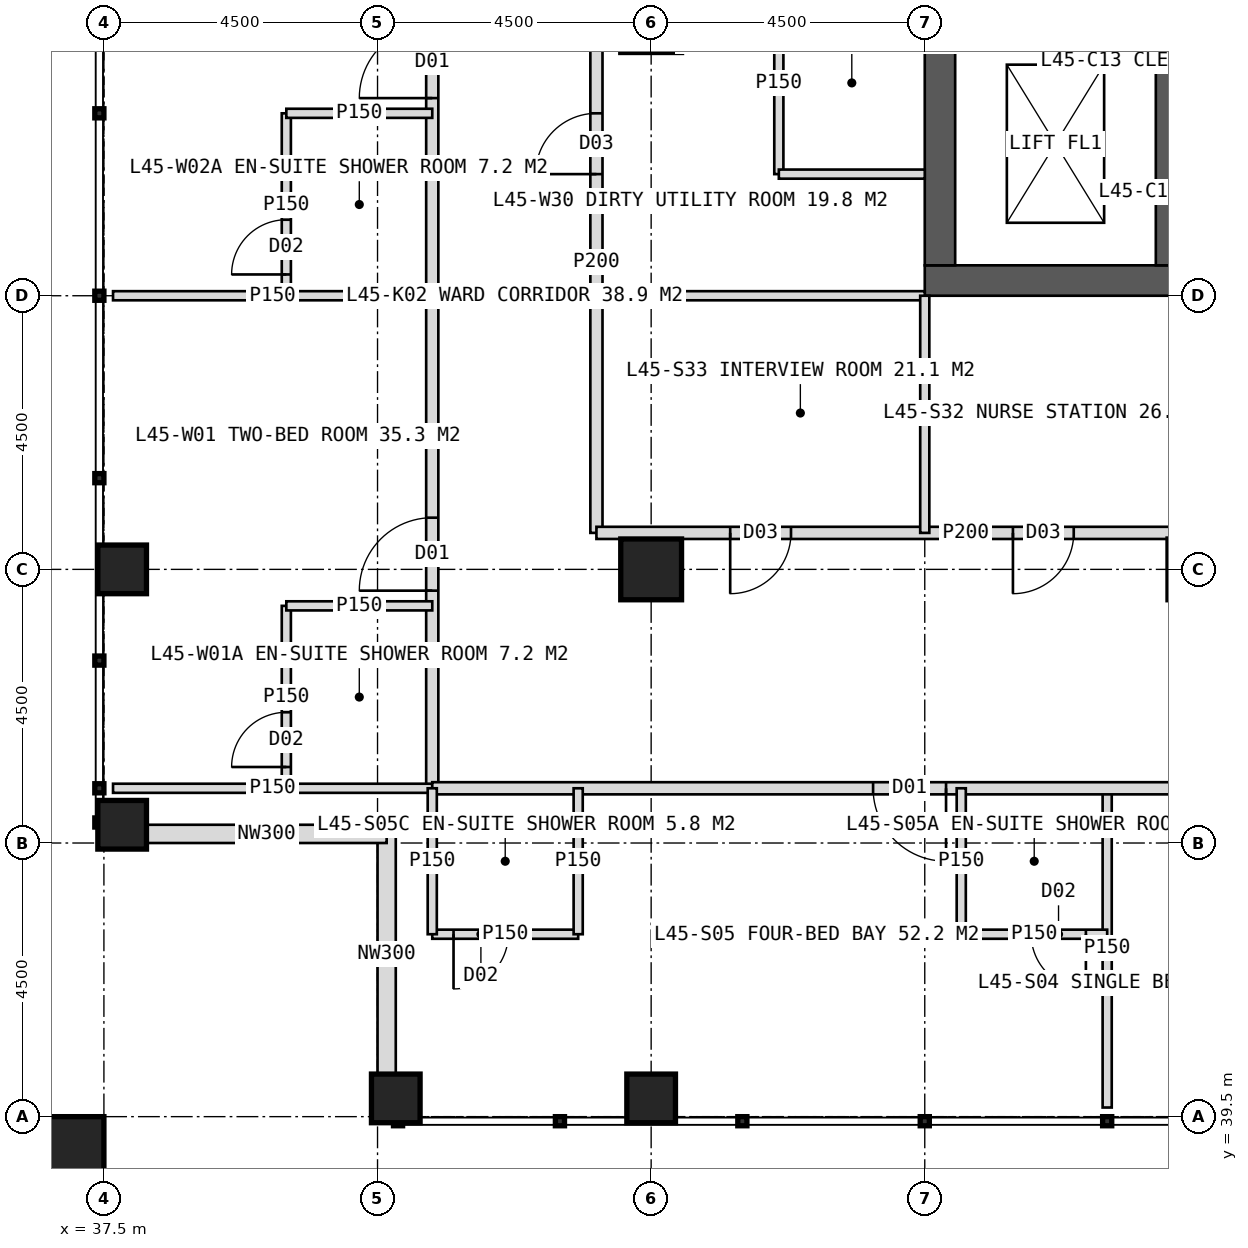
"""IFC4 building model, lengths in metres.
Left out: names, types, materials, properties, quantities, classifications, styles, units other than length and angle.
Written with IfcOpenShell. Run it as: python <this file> out.ifc"""

import sys

from ifc_helpers import new_model, si_unit, direction, frame, frame_2d, origin, origin_2d, place, context, subcontext, project, spatial, rectangle, hollow_rectangle, extrude, element, fill, save


model = new_model("IFC4")
c1 = context("Model", 3, precision=1e-05, world=origin(), true_north=direction((0.0, 1.0)))
c2 = subcontext(c1, "Body", "Model", "MODEL_VIEW")
j1 = project(units=[si_unit("LENGTHUNIT", "METRE"), si_unit("PLANEANGLEUNIT", "RADIAN")], contexts=[c1])
p1 = place(None, origin())
s1 = spatial("IfcSite", under=j1, at=p1, CompositionType="ELEMENT")
p2 = place(p1, origin())
s2 = spatial("IfcBuilding", under=s1, at=p2, CompositionType="ELEMENT")
p3 = place(p2, frame((0.0, 0.0, 189.0)))
s3 = spatial("IfcBuildingStorey", under=s2, at=p3, CompositionType="ELEMENT", Elevation=189.0)
p4 = place(p3, frame((51.0, 53.25, 0.0), z_axis=(0.0, 0.0, 1.0), x_axis=(1.0, 0.0, 0.0)))
e1 = element("IfcWall", 1, at=p4, inside=s3, PredefinedType="SHEAR", context=c2, shape_type="SweptSolid", body=[
    extrude(rectangle(XDim=18.0, YDim=0.5, at=frame_2d((9.0, 0.0))), origin(), (0.0, 0.0, 1.0), 4.0),
])
p5 = place(p4, frame((8.1, 0.0, 0.0)))
e2 = element("IfcOpeningElement", 2, at=p5, cuts=e1, PredefinedType="OPENING", context=c2, shape_type="SweptSolid", body=[
    extrude(rectangle(XDim=1.8, YDim=2.2, at=frame_2d((0.9, 1.1))), frame((0.0, 0.26, 0.0), z_axis=(0.0, -1.0, 0.0), x_axis=(1.0, 0.0, 0.0)), (0.0, 0.0, 1.0), 0.52),
])
p6 = place(p3, frame((51.25, 53.5, 0.0), z_axis=(0.0, 0.0, 1.0), x_axis=(0.0, 1.0, 0.0)))
e3 = element("IfcWall", 3, at=p6, inside=s3, PredefinedType="SHEAR", context=c2, shape_type="SweptSolid", body=[
    extrude(rectangle(XDim=17.0, YDim=0.5, at=frame_2d((8.5, 0.0))), origin(), (0.0, 0.0, 1.0), 4.0),
])
p7 = place(p6, frame((6.1, 0.0, 0.0)))
e4 = element("IfcOpeningElement", 4, at=p7, cuts=e3, PredefinedType="OPENING", context=c2, shape_type="SweptSolid", body=[
    extrude(rectangle(XDim=1.5, YDim=2.2, at=frame_2d((0.75, 1.1))), frame((0.0, 0.26, 0.0), z_axis=(0.0, -1.0, 0.0), x_axis=(1.0, 0.0, 0.0)), (0.0, 0.0, 1.0), 0.52),
])
p8 = place(p3, frame((54.95, 53.5, 0.0), z_axis=(0.0, 0.0, 1.0), x_axis=(0.0, 1.0, 0.0)))
e5 = element("IfcWall", 5, at=p8, inside=s3, PredefinedType="SHEAR", context=c2, shape_type="SweptSolid", body=[
    extrude(rectangle(XDim=17.0, YDim=0.3, at=frame_2d((8.5, 0.0))), origin(), (0.0, 0.0, 1.0), 4.0),
])
p9 = place(p3, frame((46.5, 48.5, 0.0), z_axis=(0.0, 0.0, 1.0), x_axis=(1.0, 0.0, 0.0)))
e6 = element("IfcColumn", 6, at=p9, inside=s3, PredefinedType="COLUMN", context=c2, shape_type="SweptSolid", body=[
    extrude(hollow_rectangle(XDim=1.0, YDim=1.0, WallThickness=0.1, at=origin_2d()), origin(), (0.0, 0.0, 1.0), 4.0),
])
for number, where, z_axis, x_axis in (
    (7, (42.3, 39.8, 0.0), (0.0, 0.0, 1.0), (1.0, 0.0, 0.0)),
    (8, (37.8, 44.3, 0.0), (0.0, 0.0, 1.0), (1.0, 0.0, 0.0)),
    (9, (46.5, 39.8, 0.0), (0.0, 0.0, 1.0), (1.0, 0.0, 0.0)),
    (10, (37.8, 48.5, 0.0), (0.0, 0.0, 1.0), (1.0, 0.0, 0.0)),
):
    element("IfcColumn", number, at=place(p3, frame(where, z_axis=z_axis, x_axis=x_axis)), inside=s3, PredefinedType="COLUMN", context=c2, shape_type="SweptSolid", body=[
        extrude(hollow_rectangle(XDim=0.8, YDim=0.8, WallThickness=0.08, at=origin_2d()), origin(), (0.0, 0.0, 1.0), 4.0),
    ])
p10 = place(p3, frame((36.9, 38.9, 0.0), z_axis=(0.0, 0.0, 1.0), x_axis=(1.0, 0.0, 0.0)))
e11 = element("IfcColumn", 11, at=p10, inside=s3, PredefinedType="COLUMN", context=c2, shape_type="SweptSolid", body=[
    extrude(hollow_rectangle(XDim=1.2, YDim=1.2, WallThickness=0.07, at=origin_2d()), origin(), (0.0, 0.0, 1.0), 4.0),
])
for number, where, z_axis, x_axis in (
    (12, (42.15, 40.2, 0.0), (0.0, 0.0, 1.0), (0.0, 1.0, 0.0)),
    (13, (42.15, 44.15, 0.0), (0.0, 0.0, 1.0), (-1.0, 0.0, 0.0)),
):
    element("IfcWall", number, at=place(p3, frame(where, z_axis=z_axis, x_axis=x_axis)), inside=s3, PredefinedType="ELEMENTEDWALL", context=c2, shape_type="SweptSolid", body=[
        extrude(rectangle(XDim=3.95, YDim=0.3, at=frame_2d((1.975, 0.0))), origin(), (0.0, 0.0, 1.0), 2.85),
    ])
p11 = place(p3, frame((42.9, 53.0, 0.0), z_axis=(0.0, 0.0, 1.0), x_axis=(-1.0, 0.0, 0.0)))
e14 = element("IfcWall", 14, at=p11, inside=s3, PredefinedType="PARTITIONING", context=c2, shape_type="SweptSolid", body=[
    extrude(rectangle(XDim=5.25, YDim=0.15, at=frame_2d((2.625, 0.0))), origin(), (0.0, 0.0, 1.0), 3.75),
])
p12 = place(p3, frame((42.9, 44.9, 0.0), z_axis=(0.0, 0.0, 1.0), x_axis=(0.0, 1.0, 0.0)))
e15 = element("IfcWall", 15, at=p12, inside=s3, PredefinedType="PARTITIONING", context=c2, shape_type="SweptSolid", body=[
    extrude(rectangle(XDim=34.2, YDim=0.2, at=frame_2d((17.1, 0.0))), origin(), (0.0, 0.0, 1.0), 3.75),
])
p13 = place(p12, frame((3.25, 0.0, 0.0)))
e16 = element("IfcOpeningElement", 16, at=p13, cuts=e15, PredefinedType="OPENING", context=c2, shape_type="SweptSolid", body=[
    extrude(rectangle(XDim=1.2, YDim=2.2, at=frame_2d((0.6, 1.1))), frame((0.0, 0.11, 0.0), z_axis=(0.0, -1.0, 0.0), x_axis=(1.0, 0.0, 0.0)), (0.0, 0.0, 1.0), 0.22),
])
p14 = place(p12, frame((11.35, 0.0, 0.0)))
e17 = element("IfcOpeningElement", 17, at=p14, cuts=e15, PredefinedType="OPENING", context=c2, shape_type="SweptSolid", body=[
    extrude(rectangle(XDim=1.2, YDim=2.2, at=frame_2d((0.6, 1.1))), frame((0.0, 0.11, 0.0), z_axis=(0.0, -1.0, 0.0), x_axis=(1.0, 0.0, 0.0)), (0.0, 0.0, 1.0), 0.22),
])
p15 = place(p12, frame((20.35, 0.0, 0.0)))
e18 = element("IfcOpeningElement", 18, at=p15, cuts=e15, PredefinedType="OPENING", context=c2, shape_type="SweptSolid", body=[
    extrude(rectangle(XDim=1.2, YDim=2.2, at=frame_2d((0.6, 1.1))), frame((0.0, 0.11, 0.0), z_axis=(0.0, -1.0, 0.0), x_axis=(1.0, 0.0, 0.0)), (0.0, 0.0, 1.0), 0.22),
])
p16 = place(p12, frame((29.35, 0.0, 0.0)))
e19 = element("IfcOpeningElement", 19, at=p16, cuts=e15, PredefinedType="OPENING", context=c2, shape_type="SweptSolid", body=[
    extrude(rectangle(XDim=1.2, YDim=2.2, at=frame_2d((0.6, 1.1))), frame((0.0, 0.11, 0.0), z_axis=(0.0, -1.0, 0.0), x_axis=(1.0, 0.0, 0.0)), (0.0, 0.0, 1.0), 0.22),
])
p17 = place(p3, frame((42.9, 44.9, 0.0), z_axis=(0.0, 0.0, 1.0), x_axis=(-1.0, 0.0, 0.0)))
e20 = element("IfcWall", 20, at=p17, inside=s3, PredefinedType="PARTITIONING", context=c2, shape_type="SweptSolid", body=[
    extrude(rectangle(XDim=5.25, YDim=0.15, at=frame_2d((2.625, 0.0))), origin(), (0.0, 0.0, 1.0), 3.75),
])
p18 = place(p3, frame((40.5, 44.9, 0.0), z_axis=(0.0, 0.0, 1.0), x_axis=(0.0, 1.0, 0.0)))
e21 = element("IfcWall", 21, at=p18, inside=s3, PredefinedType="PARTITIONING", context=c2, shape_type="SweptSolid", body=[
    extrude(rectangle(XDim=3.0, YDim=0.15, at=frame_2d((1.5, 0.0))), origin(), (0.0, 0.0, 1.0), 3.75),
])
p19 = place(p18, frame((0.35, 0.0, 0.0)))
e22 = element("IfcOpeningElement", 22, at=p19, cuts=e21, PredefinedType="OPENING", context=c2, shape_type="SweptSolid", body=[
    extrude(rectangle(XDim=0.9, YDim=2.1, at=frame_2d((0.45, 1.05))), frame((0.0, 0.085, 0.0), z_axis=(0.0, -1.0, 0.0), x_axis=(1.0, 0.0, 0.0)), (0.0, 0.0, 1.0), 0.17),
])
p20 = place(p3, frame((42.9, 47.9, 0.0), z_axis=(0.0, 0.0, 1.0), x_axis=(-1.0, 0.0, 0.0)))
e23 = element("IfcWall", 23, at=p20, inside=s3, PredefinedType="PARTITIONING", context=c2, shape_type="SweptSolid", body=[
    extrude(rectangle(XDim=2.4, YDim=0.15, at=frame_2d((1.2, 0.0))), origin(), (0.0, 0.0, 1.0), 3.75),
])
p21 = place(p3, frame((40.5, 53.0, 0.0), z_axis=(0.0, 0.0, 1.0), x_axis=(0.0, 1.0, 0.0)))
e24 = element("IfcWall", 24, at=p21, inside=s3, PredefinedType="PARTITIONING", context=c2, shape_type="SweptSolid", body=[
    extrude(rectangle(XDim=3.0, YDim=0.15, at=frame_2d((1.5, 0.0))), origin(), (0.0, 0.0, 1.0), 3.75),
])
p22 = place(p21, frame((0.35, 0.0, 0.0)))
e25 = element("IfcOpeningElement", 25, at=p22, cuts=e24, PredefinedType="OPENING", context=c2, shape_type="SweptSolid", body=[
    extrude(rectangle(XDim=0.9, YDim=2.1, at=frame_2d((0.45, 1.05))), frame((0.0, 0.085, 0.0), z_axis=(0.0, -1.0, 0.0), x_axis=(1.0, 0.0, 0.0)), (0.0, 0.0, 1.0), 0.17),
])
p23 = place(p3, frame((42.9, 56.0, 0.0), z_axis=(0.0, 0.0, 1.0), x_axis=(-1.0, 0.0, 0.0)))
e26 = element("IfcWall", 26, at=p23, inside=s3, PredefinedType="PARTITIONING", context=c2, shape_type="SweptSolid", body=[
    extrude(rectangle(XDim=2.4, YDim=0.15, at=frame_2d((1.2, 0.0))), origin(), (0.0, 0.0, 1.0), 3.75),
])
p24 = place(p3, frame((51.0, 53.0, 0.0), z_axis=(0.0, 0.0, 1.0), x_axis=(-1.0, 0.0, 0.0)))
e27 = element("IfcWall", 27, at=p24, inside=s3, PredefinedType="PARTITIONING", context=c2, shape_type="SweptSolid", body=[
    extrude(rectangle(XDim=5.4, YDim=0.15, at=frame_2d((2.7, 0.0))), origin(), (0.0, 0.0, 1.0), 3.75),
])
p25 = place(p3, frame((45.6, 49.1, 0.0), z_axis=(0.0, 0.0, 1.0), x_axis=(0.0, 1.0, 0.0)))
e28 = element("IfcWall", 28, at=p25, inside=s3, PredefinedType="PARTITIONING", context=c2, shape_type="SweptSolid", body=[
    extrude(rectangle(XDim=8.9, YDim=0.2, at=frame_2d((4.45, 0.0))), origin(), (0.0, 0.0, 1.0), 3.75),
])
p26 = place(p25, frame((5.9, 0.0, 0.0)))
e29 = element("IfcOpeningElement", 29, at=p26, cuts=e28, PredefinedType="OPENING", context=c2, shape_type="SweptSolid", body=[
    extrude(rectangle(XDim=1.0, YDim=2.1, at=frame_2d((0.5, 1.05))), frame((0.0, 0.11, 0.0), z_axis=(0.0, -1.0, 0.0), x_axis=(1.0, 0.0, 0.0)), (0.0, 0.0, 1.0), 0.22),
])
p27 = place(p3, frame((48.6, 55.0, 0.0), z_axis=(0.0, 0.0, 1.0), x_axis=(0.0, 1.0, 0.0)))
e30 = element("IfcWall", 30, at=p27, inside=s3, PredefinedType="PARTITIONING", context=c2, shape_type="SweptSolid", body=[
    extrude(rectangle(XDim=3.0, YDim=0.15, at=frame_2d((1.5, 0.0))), origin(), (0.0, 0.0, 1.0), 3.75),
])
p28 = place(p3, frame((51.0, 55.0, 0.0), z_axis=(0.0, 0.0, 1.0), x_axis=(-1.0, 0.0, 0.0)))
e31 = element("IfcWall", 31, at=p28, inside=s3, PredefinedType="PARTITIONING", context=c2, shape_type="SweptSolid", body=[
    extrude(rectangle(XDim=2.4, YDim=0.15, at=frame_2d((1.2, 0.0))), origin(), (0.0, 0.0, 1.0), 3.75),
])
p29 = place(p3, frame((54.0, 44.9, 0.0), z_axis=(0.0, 0.0, 1.0), x_axis=(0.0, -1.0, 0.0)))
e32 = element("IfcWall", 32, at=p29, inside=s3, PredefinedType="PARTITIONING", context=c2, shape_type="SweptSolid", body=[
    extrude(rectangle(XDim=5.25, YDim=0.15, at=frame_2d((2.625, 0.0))), origin(), (0.0, 0.0, 1.0), 3.75),
])
p30 = place(p3, frame((77.1, 44.9, 0.0), z_axis=(0.0, 0.0, 1.0), x_axis=(-1.0, 0.0, 0.0)))
e33 = element("IfcWall", 33, at=p30, inside=s3, PredefinedType="PARTITIONING", context=c2, shape_type="SweptSolid", body=[
    extrude(rectangle(XDim=34.2, YDim=0.2, at=frame_2d((17.1, 0.0))), origin(), (0.0, 0.0, 1.0), 3.75),
])
p31 = place(p30, frame((2.65, 0.0, 0.0)))
e34 = element("IfcOpeningElement", 34, at=p31, cuts=e33, PredefinedType="OPENING", context=c2, shape_type="SweptSolid", body=[
    extrude(rectangle(XDim=1.2, YDim=2.2, at=frame_2d((0.6, 1.1))), frame((0.0, 0.11, 0.0), z_axis=(0.0, -1.0, 0.0), x_axis=(1.0, 0.0, 0.0)), (0.0, 0.0, 1.0), 0.22),
])
p32 = place(p30, frame((7.75, 0.0, 0.0)))
e35 = element("IfcOpeningElement", 35, at=p32, cuts=e33, PredefinedType="OPENING", context=c2, shape_type="SweptSolid", body=[
    extrude(rectangle(XDim=1.2, YDim=2.2, at=frame_2d((0.6, 1.1))), frame((0.0, 0.11, 0.0), z_axis=(0.0, -1.0, 0.0), x_axis=(1.0, 0.0, 0.0)), (0.0, 0.0, 1.0), 0.22),
])
p33 = place(p30, frame((13.75, 0.0, 0.0)))
e36 = element("IfcOpeningElement", 36, at=p33, cuts=e33, PredefinedType="OPENING", context=c2, shape_type="SweptSolid", body=[
    extrude(rectangle(XDim=1.2, YDim=2.2, at=frame_2d((0.6, 1.1))), frame((0.0, 0.11, 0.0), z_axis=(0.0, -1.0, 0.0), x_axis=(1.0, 0.0, 0.0)), (0.0, 0.0, 1.0), 0.22),
])
p34 = place(p30, frame((19.75, 0.0, 0.0)))
e37 = element("IfcOpeningElement", 37, at=p34, cuts=e33, PredefinedType="OPENING", context=c2, shape_type="SweptSolid", body=[
    extrude(rectangle(XDim=1.2, YDim=2.2, at=frame_2d((0.6, 1.1))), frame((0.0, 0.11, 0.0), z_axis=(0.0, -1.0, 0.0), x_axis=(1.0, 0.0, 0.0)), (0.0, 0.0, 1.0), 0.22),
])
p35 = place(p30, frame((25.75, 0.0, 0.0)))
e38 = element("IfcOpeningElement", 38, at=p35, cuts=e33, PredefinedType="OPENING", context=c2, shape_type="SweptSolid", body=[
    extrude(rectangle(XDim=1.2, YDim=2.2, at=frame_2d((0.6, 1.1))), frame((0.0, 0.11, 0.0), z_axis=(0.0, -1.0, 0.0), x_axis=(1.0, 0.0, 0.0)), (0.0, 0.0, 1.0), 0.22),
])
p36 = place(p3, frame((54.0, 42.5, 0.0), z_axis=(0.0, 0.0, 1.0), x_axis=(-1.0, 0.0, 0.0)))
e39 = element("IfcWall", 39, at=p36, inside=s3, PredefinedType="PARTITIONING", context=c2, shape_type="SweptSolid", body=[
    extrude(rectangle(XDim=2.4, YDim=0.15, at=frame_2d((1.2, 0.0))), origin(), (0.0, 0.0, 1.0), 3.75),
])
p37 = place(p36, frame((0.35, 0.0, 0.0)))
e40 = element("IfcOpeningElement", 40, at=p37, cuts=e39, PredefinedType="OPENING", context=c2, shape_type="SweptSolid", body=[
    extrude(rectangle(XDim=0.9, YDim=2.1, at=frame_2d((0.45, 1.05))), frame((0.0, 0.085, 0.0), z_axis=(0.0, -1.0, 0.0), x_axis=(1.0, 0.0, 0.0)), (0.0, 0.0, 1.0), 0.17),
])
p38 = place(p3, frame((51.6, 44.9, 0.0), z_axis=(0.0, 0.0, 1.0), x_axis=(0.0, -1.0, 0.0)))
e41 = element("IfcWall", 41, at=p38, inside=s3, PredefinedType="PARTITIONING", context=c2, shape_type="SweptSolid", body=[
    extrude(rectangle(XDim=2.4, YDim=0.15, at=frame_2d((1.2, 0.0))), origin(), (0.0, 0.0, 1.0), 3.75),
])
p39 = place(p3, frame((45.3, 42.5, 0.0), z_axis=(0.0, 0.0, 1.0), x_axis=(-1.0, 0.0, 0.0)))
e42 = element("IfcWall", 42, at=p39, inside=s3, PredefinedType="PARTITIONING", context=c2, shape_type="SweptSolid", body=[
    extrude(rectangle(XDim=2.4, YDim=0.15, at=frame_2d((1.2, 0.0))), origin(), (0.0, 0.0, 1.0), 3.75),
])
p40 = place(p39, frame((1.15, 0.0, 0.0)))
e43 = element("IfcOpeningElement", 43, at=p40, cuts=e42, PredefinedType="OPENING", context=c2, shape_type="SweptSolid", body=[
    extrude(rectangle(XDim=0.9, YDim=2.1, at=frame_2d((0.45, 1.05))), frame((0.0, 0.085, 0.0), z_axis=(0.0, -1.0, 0.0), x_axis=(1.0, 0.0, 0.0)), (0.0, 0.0, 1.0), 0.17),
])
for number, where, z_axis, x_axis in (
    (44, (45.3, 44.9, 0.0), (0.0, 0.0, 1.0), (0.0, -1.0, 0.0)),
    (45, (42.9, 44.9, 0.0), (0.0, 0.0, 1.0), (0.0, -1.0, 0.0)),
):
    element("IfcWall", number, at=place(p3, frame(where, z_axis=z_axis, x_axis=x_axis)), inside=s3, PredefinedType="PARTITIONING", context=c2, shape_type="SweptSolid", body=[
        extrude(rectangle(XDim=2.4, YDim=0.15, at=frame_2d((1.2, 0.0))), origin(), (0.0, 0.0, 1.0), 3.75),
    ])
p41 = place(p3, frame((57.75, 49.1, 0.0), z_axis=(0.0, 0.0, 1.0), x_axis=(-1.0, 0.0, 0.0)))
e46 = element("IfcWall", 46, at=p41, inside=s3, PredefinedType="PARTITIONING", context=c2, shape_type="SweptSolid", body=[
    extrude(rectangle(XDim=12.15, YDim=0.2, at=frame_2d((6.075, 0.0))), origin(), (0.0, 0.0, 1.0), 3.75),
])
p42 = place(p41, frame((4.3, 0.0, 0.0)))
e47 = element("IfcOpeningElement", 47, at=p42, cuts=e46, PredefinedType="OPENING", context=c2, shape_type="SweptSolid", body=[
    extrude(rectangle(XDim=1.0, YDim=2.1, at=frame_2d((0.5, 1.05))), frame((0.0, 0.11, 0.0), z_axis=(0.0, -1.0, 0.0), x_axis=(1.0, 0.0, 0.0)), (0.0, 0.0, 1.0), 0.22),
])
p43 = place(p41, frame((8.95, 0.0, 0.0)))
e48 = element("IfcOpeningElement", 48, at=p43, cuts=e46, PredefinedType="OPENING", context=c2, shape_type="SweptSolid", body=[
    extrude(rectangle(XDim=1.0, YDim=2.1, at=frame_2d((0.5, 1.05))), frame((0.0, 0.11, 0.0), z_axis=(0.0, -1.0, 0.0), x_axis=(1.0, 0.0, 0.0)), (0.0, 0.0, 1.0), 0.22),
])
p44 = place(p3, frame((51.0, 53.0, 0.0), z_axis=(0.0, 0.0, 1.0), x_axis=(0.0, -1.0, 0.0)))
e49 = element("IfcWall", 49, at=p44, inside=s3, PredefinedType="PARTITIONING", context=c2, shape_type="SweptSolid", body=[
    extrude(rectangle(XDim=3.9, YDim=0.15, at=frame_2d((1.95, 0.0))), origin(), (0.0, 0.0, 1.0), 3.75),
])
p45 = place(p13, origin())
e50 = element("IfcDoor", 50, at=p45, inside=s3, OperationType="SINGLE_SWING_LEFT", PredefinedType="DOOR", context=c2, shape_type="SweptSolid", body=[
    extrude(rectangle(XDim=1.2, YDim=2.2, at=frame_2d((0.6, 1.1))), frame((0.0, 0.025, 0.0), z_axis=(0.0, -1.0, 0.0), x_axis=(1.0, 0.0, 0.0)), (0.0, 0.0, 1.0), 0.05),
])
fill(e16, e50)
p46 = place(p19, origin())
e51 = element("IfcDoor", 51, at=p46, inside=s3, OperationType="SINGLE_SWING_LEFT", PredefinedType="DOOR", context=c2, shape_type="SweptSolid", body=[
    extrude(rectangle(XDim=0.9, YDim=2.1, at=frame_2d((0.45, 1.05))), frame((0.0, 0.025, 0.0), z_axis=(0.0, -1.0, 0.0), x_axis=(1.0, 0.0, 0.0)), (0.0, 0.0, 1.0), 0.05),
])
fill(e22, e51)
p47 = place(p14, origin())
e52 = element("IfcDoor", 52, at=p47, inside=s3, OperationType="SINGLE_SWING_LEFT", PredefinedType="DOOR", context=c2, shape_type="SweptSolid", body=[
    extrude(rectangle(XDim=1.2, YDim=2.2, at=frame_2d((0.6, 1.1))), frame((0.0, 0.025, 0.0), z_axis=(0.0, -1.0, 0.0), x_axis=(1.0, 0.0, 0.0)), (0.0, 0.0, 1.0), 0.05),
])
fill(e17, e52)
p48 = place(p22, origin())
e53 = element("IfcDoor", 53, at=p48, inside=s3, OperationType="SINGLE_SWING_LEFT", PredefinedType="DOOR", context=c2, shape_type="SweptSolid", body=[
    extrude(rectangle(XDim=0.9, YDim=2.1, at=frame_2d((0.45, 1.05))), frame((0.0, 0.025, 0.0), z_axis=(0.0, -1.0, 0.0), x_axis=(1.0, 0.0, 0.0)), (0.0, 0.0, 1.0), 0.05),
])
fill(e25, e53)
p49 = place(p26, origin())
e54 = element("IfcDoor", 54, at=p49, inside=s3, OperationType="SINGLE_SWING_LEFT", PredefinedType="DOOR", context=c2, shape_type="SweptSolid", body=[
    extrude(rectangle(XDim=1.0, YDim=2.1, at=frame_2d((0.5, 1.05))), frame((0.0, 0.025, 0.0), z_axis=(0.0, -1.0, 0.0), x_axis=(1.0, 0.0, 0.0)), (0.0, 0.0, 1.0), 0.05),
])
fill(e29, e54)
p50 = place(p35, origin())
e55 = element("IfcDoor", 55, at=p50, inside=s3, OperationType="SINGLE_SWING_LEFT", PredefinedType="DOOR", context=c2, shape_type="SweptSolid", body=[
    extrude(rectangle(XDim=1.2, YDim=2.2, at=frame_2d((0.6, 1.1))), frame((0.0, 0.025, 0.0), z_axis=(0.0, -1.0, 0.0), x_axis=(1.0, 0.0, 0.0)), (0.0, 0.0, 1.0), 0.05),
])
fill(e38, e55)
p51 = place(p37, origin())
e56 = element("IfcDoor", 56, at=p51, inside=s3, OperationType="SINGLE_SWING_LEFT", PredefinedType="DOOR", context=c2, shape_type="SweptSolid", body=[
    extrude(rectangle(XDim=0.9, YDim=2.1, at=frame_2d((0.45, 1.05))), frame((0.0, 0.025, 0.0), z_axis=(0.0, -1.0, 0.0), x_axis=(1.0, 0.0, 0.0)), (0.0, 0.0, 1.0), 0.05),
])
fill(e40, e56)
p52 = place(p40, origin())
e57 = element("IfcDoor", 57, at=p52, inside=s3, OperationType="SINGLE_SWING_RIGHT", PredefinedType="DOOR", context=c2, shape_type="SweptSolid", body=[
    extrude(rectangle(XDim=0.9, YDim=2.1, at=frame_2d((0.45, 1.05))), frame((0.0, 0.025, 0.0), z_axis=(0.0, -1.0, 0.0), x_axis=(1.0, 0.0, 0.0)), (0.0, 0.0, 1.0), 0.05),
])
fill(e43, e57)
p53 = place(p42, origin())
e58 = element("IfcDoor", 58, at=p53, inside=s3, OperationType="SINGLE_SWING_RIGHT", PredefinedType="DOOR", context=c2, shape_type="SweptSolid", body=[
    extrude(rectangle(XDim=1.0, YDim=2.1, at=frame_2d((0.5, 1.05))), frame((0.0, 0.025, 0.0), z_axis=(0.0, -1.0, 0.0), x_axis=(1.0, 0.0, 0.0)), (0.0, 0.0, 1.0), 0.05),
])
fill(e47, e58)
p54 = place(p43, origin())
e59 = element("IfcDoor", 59, at=p54, inside=s3, OperationType="SINGLE_SWING_RIGHT", PredefinedType="DOOR", context=c2, shape_type="SweptSolid", body=[
    extrude(rectangle(XDim=1.0, YDim=2.1, at=frame_2d((0.5, 1.05))), frame((0.0, 0.025, 0.0), z_axis=(0.0, -1.0, 0.0), x_axis=(1.0, 0.0, 0.0)), (0.0, 0.0, 1.0), 0.05),
])
fill(e48, e59)
save(model, sys.argv[1])
